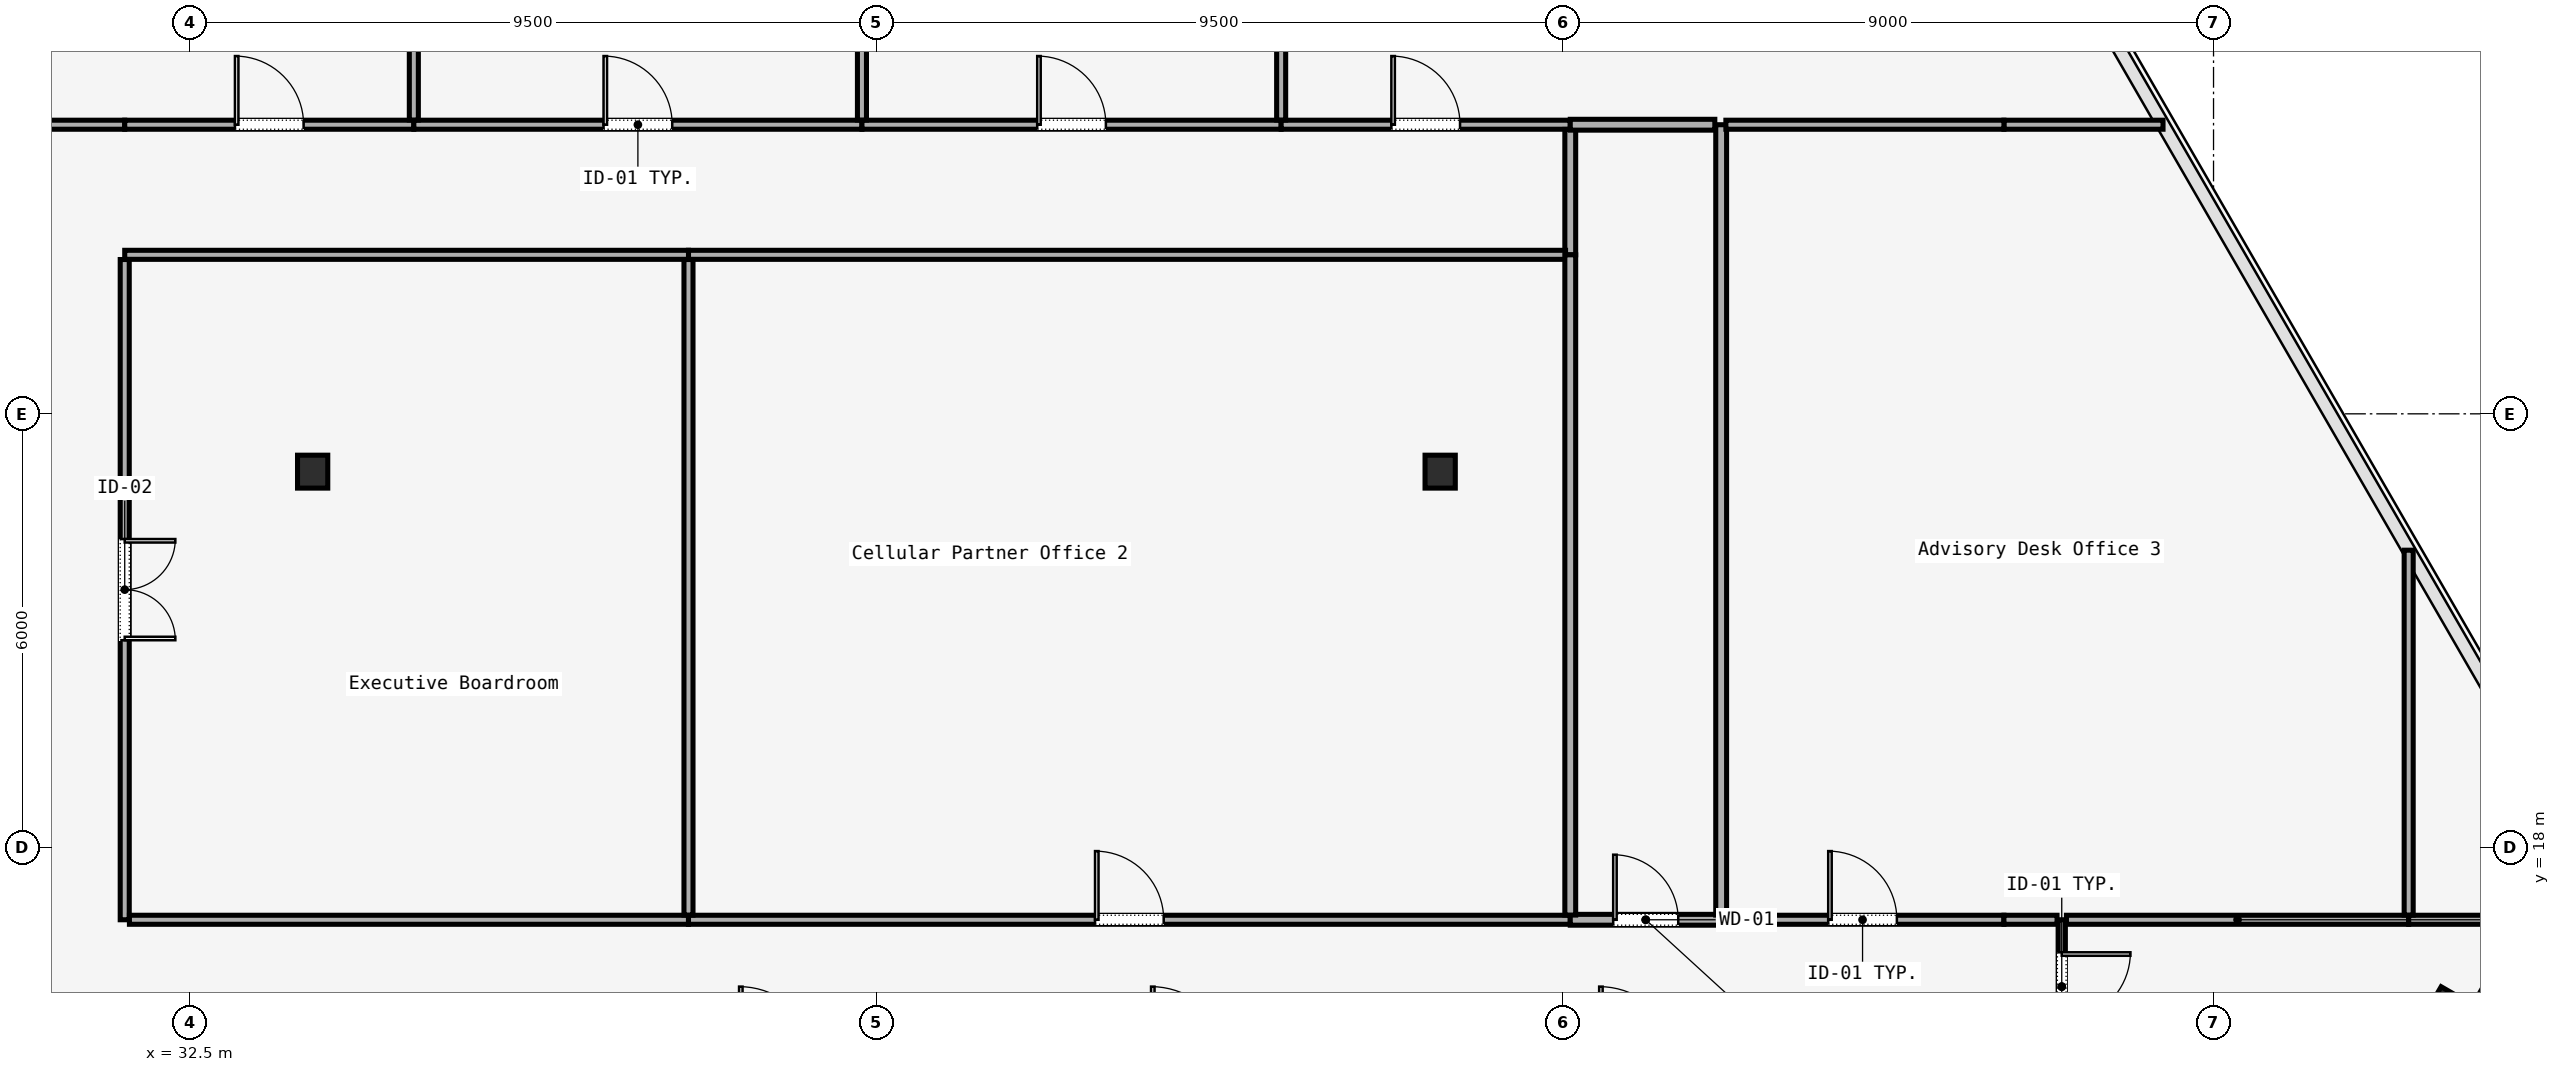
"""IFC4 building model, lengths in metres.
Left out: names, types, materials, properties, quantities, classifications, styles, units other than length and angle.
Written with IfcOpenShell. Run it as: python <this file> out.ifc"""

import sys

from ifc_helpers import new_model, si_unit, direction, frame, frame_2d, origin, origin_2d, place, context, subcontext, project, spatial, rectangle, i_section, extrude, element, fill, save


model = new_model("IFC4")
c1 = context("Model", 3, precision=1e-05, world=origin(), true_north=direction((0.0, 1.0)))
c2 = subcontext(c1, "Body", "Model", "MODEL_VIEW")
j1 = project(units=[si_unit("LENGTHUNIT", "METRE"), si_unit("PLANEANGLEUNIT", "RADIAN")], contexts=[c1])
p1 = place(None, origin())
s1 = spatial("IfcSite", under=j1, at=p1, CompositionType="ELEMENT")
p2 = place(p1, origin())
s2 = spatial("IfcBuilding", under=s1, at=p2, CompositionType="ELEMENT")
p3 = place(p2, frame((0.0, 0.0, 70.2)))
s3 = spatial("IfcBuildingStorey", under=s2, at=p3, CompositionType="ELEMENT", Elevation=70.2)
for number, where, z_axis, x_axis in (
    (1, (34.2, 23.2, 0.0), (0.0, 0.0, 1.0), (1.0, 0.0, 0.0)),
    (2, (49.8, 23.2, 0.0), (0.0, 0.0, 1.0), (1.0, 0.0, 0.0)),
):
    element("IfcColumn", number, at=place(p3, frame(where, z_axis=z_axis, x_axis=x_axis)), inside=s3, PredefinedType="COLUMN", context=c2, shape_type="SweptSolid", body=[
        extrude(i_section(OverallWidth=0.418, OverallDepth=0.456, WebThickness=0.042, FlangeThickness=0.067, FilletRadius=0.015, at=origin_2d()), origin(), (0.0, 0.0, 1.0), 3.58),
    ])
p4 = place(p3, frame((63.763, 15.756, 0.0), z_axis=(0.0, 0.0, 1.0), x_axis=(0.5, 0.866025403784, 0.0)))
e3 = element("IfcColumn", 3, at=p4, inside=s3, PredefinedType="COLUMN", context=c2, shape_type="SweptSolid", body=[
    extrude(i_section(OverallWidth=0.437, OverallDepth=0.514, WebThickness=0.061, FlangeThickness=0.077, FilletRadius=0.015, at=origin_2d()), origin(), (0.0, 0.0, 1.0), 3.58),
])
p5 = place(p3, frame((58.4, 17.0, 0.0), z_axis=(0.0, 0.0, 1.0), x_axis=(0.0, -1.0, 0.0)))
e4 = element("IfcWall", 4, at=p5, inside=s3, PredefinedType="MOVABLE", context=c2, shape_type="SweptSolid", body=[
    extrude(rectangle(XDim=1.85, YDim=0.1, at=frame_2d((0.925, 0.0))), origin(), (0.0, 0.0, 1.0), 2.95),
])
p6 = place(p5, frame((0.45, 0.0, 0.0)))
e5 = element("IfcOpeningElement", 5, at=p6, cuts=e4, PredefinedType="OPENING", context=c2, shape_type="SweptSolid", body=[
    extrude(rectangle(XDim=0.95, YDim=2.2, at=frame_2d((0.475, 1.1))), frame((0.0, 0.05, 0.0), z_axis=(0.0, -1.0, 0.0), x_axis=(1.0, 0.0, 0.0)), (0.0, 0.0, 1.0), 0.1),
])
p7 = place(p3, frame((29.865, 28.0, 0.0), z_axis=(0.0, 0.0, 1.0), x_axis=(1.0, 0.0, 0.0)))
e6 = element("IfcWall", 6, at=p7, inside=s3, PredefinedType="PARTITIONING", context=c2, shape_type="SweptSolid", body=[
    extrude(rectangle(XDim=1.735, YDim=0.125, at=frame_2d((0.868, 0.0))), origin(), (0.0, 0.0, 1.0), 2.95),
])
p8 = place(p3, frame((31.6, 28.0, 0.0), z_axis=(0.0, 0.0, 1.0), x_axis=(1.0, 0.0, 0.0)))
e7 = element("IfcWall", 7, at=p8, inside=s3, PredefinedType="PARTITIONING", context=c2, shape_type="SweptSolid", body=[
    extrude(rectangle(XDim=4.0, YDim=0.125, at=frame_2d((2.0, 0.0))), origin(), (0.0, 0.0, 1.0), 2.95),
])
p9 = place(p8, frame((1.525, 0.0, 0.0)))
e8 = element("IfcOpeningElement", 8, at=p9, cuts=e7, PredefinedType="OPENING", context=c2, shape_type="SweptSolid", body=[
    extrude(rectangle(XDim=0.95, YDim=2.2, at=frame_2d((0.475, 1.1))), frame((0.0, 0.062, 0.0), z_axis=(0.0, -1.0, 0.0), x_axis=(1.0, 0.0, 0.0)), (0.0, 0.0, 1.0), 0.125),
])
p10 = place(p3, frame((35.6, 28.0, 0.0), z_axis=(0.0, 0.0, 1.0), x_axis=(1.0, 0.0, 0.0)))
e9 = element("IfcWall", 9, at=p10, inside=s3, PredefinedType="PARTITIONING", context=c2, shape_type="SweptSolid", body=[
    extrude(rectangle(XDim=6.2, YDim=0.125, at=frame_2d((3.1, 0.0))), origin(), (0.0, 0.0, 1.0), 2.95),
])
p11 = place(p10, frame((2.625, 0.0, 0.0)))
e10 = element("IfcOpeningElement", 10, at=p11, cuts=e9, PredefinedType="OPENING", context=c2, shape_type="SweptSolid", body=[
    extrude(rectangle(XDim=0.95, YDim=2.2, at=frame_2d((0.475, 1.1))), frame((0.0, 0.062, 0.0), z_axis=(0.0, -1.0, 0.0), x_axis=(1.0, 0.0, 0.0)), (0.0, 0.0, 1.0), 0.125),
])
p12 = place(p3, frame((41.8, 28.0, 0.0), z_axis=(0.0, 0.0, 1.0), x_axis=(1.0, 0.0, 0.0)))
e11 = element("IfcWall", 11, at=p12, inside=s3, PredefinedType="PARTITIONING", context=c2, shape_type="SweptSolid", body=[
    extrude(rectangle(XDim=5.8, YDim=0.125, at=frame_2d((2.9, 0.0))), origin(), (0.0, 0.0, 1.0), 2.95),
])
p13 = place(p12, frame((2.425, 0.0, 0.0)))
e12 = element("IfcOpeningElement", 12, at=p13, cuts=e11, PredefinedType="OPENING", context=c2, shape_type="SweptSolid", body=[
    extrude(rectangle(XDim=0.95, YDim=2.2, at=frame_2d((0.475, 1.1))), frame((0.0, 0.062, 0.0), z_axis=(0.0, -1.0, 0.0), x_axis=(1.0, 0.0, 0.0)), (0.0, 0.0, 1.0), 0.125),
])
p14 = place(p3, frame((47.6, 28.0, 0.0), z_axis=(0.0, 0.0, 1.0), x_axis=(1.0, 0.0, 0.0)))
e13 = element("IfcWall", 13, at=p14, inside=s3, PredefinedType="PARTITIONING", context=c2, shape_type="SweptSolid", body=[
    extrude(rectangle(XDim=4.0, YDim=0.125, at=frame_2d((2.0, 0.0))), origin(), (0.0, 0.0, 1.0), 2.95),
])
p15 = place(p14, frame((1.525, 0.0, 0.0)))
e14 = element("IfcOpeningElement", 14, at=p15, cuts=e13, PredefinedType="OPENING", context=c2, shape_type="SweptSolid", body=[
    extrude(rectangle(XDim=0.95, YDim=2.2, at=frame_2d((0.475, 1.1))), frame((0.0, 0.062, 0.0), z_axis=(0.0, -1.0, 0.0), x_axis=(1.0, 0.0, 0.0)), (0.0, 0.0, 1.0), 0.125),
])
p16 = place(p3, frame((51.6, 27.935, 0.0), z_axis=(0.0, 0.0, 1.0), x_axis=(0.0, -1.0, 0.0)))
e15 = element("IfcWall", 15, at=p16, inside=s3, PredefinedType="PARTITIONING", context=c2, shape_type="SweptSolid", body=[
    extrude(rectangle(XDim=1.735, YDim=0.15, at=frame_2d((0.868, 0.0))), origin(), (0.0, 0.0, 1.0), 2.95),
])
p17 = place(p3, frame((51.535, 26.2, 0.0), z_axis=(0.0, 0.0, 1.0), x_axis=(-1.0, 0.0, 0.0)))
e16 = element("IfcWall", 16, at=p17, inside=s3, PredefinedType="PARTITIONING", context=c2, shape_type="SweptSolid", body=[
    extrude(rectangle(XDim=12.135, YDim=0.125, at=frame_2d((6.067, 0.0))), origin(), (0.0, 0.0, 1.0), 2.95),
])
p18 = place(p3, frame((39.4, 26.2, 0.0), z_axis=(0.0, 0.0, 1.0), x_axis=(-1.0, 0.0, 0.0)))
e17 = element("IfcWall", 17, at=p18, inside=s3, PredefinedType="PARTITIONING", context=c2, shape_type="SweptSolid", body=[
    extrude(rectangle(XDim=7.8, YDim=0.125, at=frame_2d((3.9, 0.0))), origin(), (0.0, 0.0, 1.0), 2.95),
])
p19 = place(p3, frame((31.6, 26.135, 0.0), z_axis=(0.0, 0.0, 1.0), x_axis=(0.0, -1.0, 0.0)))
e18 = element("IfcWall", 18, at=p19, inside=s3, PredefinedType="PARTITIONING", context=c2, shape_type="SweptSolid", body=[
    extrude(rectangle(XDim=9.135, YDim=0.125, at=frame_2d((4.567, 0.0))), origin(), (0.0, 0.0, 1.0), 2.95),
])
p20 = place(p19, frame((3.867, 0.0, 0.0)))
e19 = element("IfcOpeningElement", 19, at=p20, cuts=e18, PredefinedType="OPENING", context=c2, shape_type="SweptSolid", body=[
    extrude(rectangle(XDim=1.4, YDim=2.2, at=frame_2d((0.7, 1.1))), frame((0.0, 0.062, 0.0), z_axis=(0.0, -1.0, 0.0), x_axis=(1.0, 0.0, 0.0)), (0.0, 0.0, 1.0), 0.125),
])
p21 = place(p3, frame((31.665, 17.0, 0.0), z_axis=(0.0, 0.0, 1.0), x_axis=(1.0, 0.0, 0.0)))
e20 = element("IfcWall", 20, at=p21, inside=s3, PredefinedType="PARTITIONING", context=c2, shape_type="SweptSolid", body=[
    extrude(rectangle(XDim=7.735, YDim=0.125, at=frame_2d((3.867, 0.0))), origin(), (0.0, 0.0, 1.0), 2.95),
])
p22 = place(p3, frame((39.4, 17.0, 0.0), z_axis=(0.0, 0.0, 1.0), x_axis=(1.0, 0.0, 0.0)))
e21 = element("IfcWall", 21, at=p22, inside=s3, PredefinedType="PARTITIONING", context=c2, shape_type="SweptSolid", body=[
    extrude(rectangle(XDim=12.2, YDim=0.125, at=frame_2d((6.1, 0.0))), origin(), (0.0, 0.0, 1.0), 2.95),
])
p23 = place(p22, frame((5.625, 0.0, 0.0)))
e22 = element("IfcOpeningElement", 22, at=p23, cuts=e21, PredefinedType="OPENING", context=c2, shape_type="SweptSolid", body=[
    extrude(rectangle(XDim=0.95, YDim=2.2, at=frame_2d((0.475, 1.1))), frame((0.0, 0.062, 0.0), z_axis=(0.0, -1.0, 0.0), x_axis=(1.0, 0.0, 0.0)), (0.0, 0.0, 1.0), 0.125),
])
p24 = place(p3, frame((51.6, 17.0, 0.0), z_axis=(0.0, 0.0, 1.0), x_axis=(1.0, 0.0, 0.0)))
e23 = element("IfcWall", 23, at=p24, inside=s3, PredefinedType="PARTITIONING", context=c2, shape_type="SweptSolid", body=[
    extrude(rectangle(XDim=2.088, YDim=0.15, at=frame_2d((1.044, 0.0))), origin(), (0.0, 0.0, 1.0), 2.95),
])
p25 = place(p24, frame((0.594, 0.0, 0.0)))
e24 = element("IfcOpeningElement", 24, at=p25, cuts=e23, PredefinedType="OPENING", context=c2, shape_type="SweptSolid", body=[
    extrude(rectangle(XDim=0.9, YDim=2.15, at=frame_2d((0.45, 1.075))), frame((0.0, 0.075, 0.0), z_axis=(0.0, -1.0, 0.0), x_axis=(1.0, 0.0, 0.0)), (0.0, 0.0, 1.0), 0.15),
])
p26 = place(p3, frame((53.688, 17.0, 0.0), z_axis=(0.0, 0.0, 1.0), x_axis=(1.0, 0.0, 0.0)))
e25 = element("IfcWall", 25, at=p26, inside=s3, PredefinedType="PARTITIONING", context=c2, shape_type="SweptSolid", body=[
    extrude(rectangle(XDim=3.912, YDim=0.125, at=frame_2d((1.956, 0.0))), origin(), (0.0, 0.0, 1.0), 2.95),
])
p27 = place(p26, frame((1.481, 0.0, 0.0)))
e26 = element("IfcOpeningElement", 26, at=p27, cuts=e25, PredefinedType="OPENING", context=c2, shape_type="SweptSolid", body=[
    extrude(rectangle(XDim=0.95, YDim=2.2, at=frame_2d((0.475, 1.1))), frame((0.0, 0.062, 0.0), z_axis=(0.0, -1.0, 0.0), x_axis=(1.0, 0.0, 0.0)), (0.0, 0.0, 1.0), 0.125),
])
p28 = place(p3, frame((57.6, 17.0, 0.0), z_axis=(0.0, 0.0, 1.0), x_axis=(1.0, 0.0, 0.0)))
e27 = element("IfcWall", 27, at=p28, inside=s3, PredefinedType="PARTITIONING", context=c2, shape_type="SweptSolid", body=[
    extrude(rectangle(XDim=0.735, YDim=0.125, at=frame_2d((0.367, 0.0))), origin(), (0.0, 0.0, 1.0), 2.95),
])
p29 = place(p3, frame((58.465, 17.0, 0.0), z_axis=(0.0, 0.0, 1.0), x_axis=(1.0, 0.0, 0.0)))
e28 = element("IfcWall", 28, at=p29, inside=s3, PredefinedType="PARTITIONING", context=c2, shape_type="SweptSolid", body=[
    extrude(rectangle(XDim=4.735, YDim=0.125, at=frame_2d((2.367, 0.0))), origin(), (0.0, 0.0, 1.0), 2.95),
])
p30 = place(p3, frame((63.2, 17.0, 0.0), z_axis=(0.0, 0.0, 1.0), x_axis=(1.0, 0.0, 0.0)))
e29 = element("IfcWall", 29, at=p30, inside=s3, PredefinedType="PARTITIONING", context=c2, shape_type="SweptSolid", body=[
    extrude(rectangle(XDim=1.651, YDim=0.125, at=frame_2d((0.825, 0.0))), origin(), (0.0, 0.0, 1.0), 2.95),
])
p31 = place(p3, frame((39.4, 26.135, 0.0), z_axis=(0.0, 0.0, 1.0), x_axis=(0.0, -1.0, 0.0)))
e30 = element("IfcWall", 30, at=p31, inside=s3, PredefinedType="PARTITIONING", context=c2, shape_type="SweptSolid", body=[
    extrude(rectangle(XDim=9.07, YDim=0.125, at=frame_2d((4.535, 0.0))), origin(), (0.0, 0.0, 1.0), 2.95),
])
p32 = place(p3, frame((51.6, 26.2, 0.0), z_axis=(0.0, 0.0, 1.0), x_axis=(0.0, -1.0, 0.0)))
e31 = element("IfcWall", 31, at=p32, inside=s3, PredefinedType="PARTITIONING", context=c2, shape_type="SweptSolid", body=[
    extrude(rectangle(XDim=9.135, YDim=0.15, at=frame_2d((4.567, 0.0))), origin(), (0.0, 0.0, 1.0), 2.95),
])
p33 = place(p3, frame((57.6, 28.0, 0.0), z_axis=(0.0, 0.0, 1.0), x_axis=(1.0, 0.0, 0.0)))
e32 = element("IfcWall", 32, at=p33, inside=s3, PredefinedType="PARTITIONING", context=c2, shape_type="SweptSolid", body=[
    extrude(rectangle(XDim=2.201, YDim=0.125, at=frame_2d((1.101, 0.0))), origin(), (0.0, 0.0, 1.0), 2.95),
])
p34 = place(p3, frame((63.2, 22.113, 0.0), z_axis=(0.0, 0.0, 1.0), x_axis=(0.0, -1.0, 0.0)))
e33 = element("IfcWall", 33, at=p34, inside=s3, PredefinedType="PARTITIONING", context=c2, shape_type="SweptSolid", body=[
    extrude(rectangle(XDim=5.048, YDim=0.125, at=frame_2d((2.524, 0.0))), origin(), (0.0, 0.0, 1.0), 2.95),
])
p35 = place(p3, frame((53.688, 17.065, 0.0), z_axis=(0.0, 0.0, 1.0), x_axis=(0.0, 1.0, 0.0)))
e34 = element("IfcWall", 34, at=p35, inside=s3, PredefinedType="PARTITIONING", context=c2, shape_type="SweptSolid", body=[
    extrude(rectangle(XDim=10.935, YDim=0.15, at=frame_2d((5.468, 0.0))), origin(), (0.0, 0.0, 1.0), 2.95),
])
p36 = place(p3, frame((53.753, 28.0, 0.0), z_axis=(0.0, 0.0, 1.0), x_axis=(1.0, 0.0, 0.0)))
e35 = element("IfcWall", 35, at=p36, inside=s3, PredefinedType="PARTITIONING", context=c2, shape_type="SweptSolid", body=[
    extrude(rectangle(XDim=3.847, YDim=0.125, at=frame_2d((1.924, 0.0))), origin(), (0.0, 0.0, 1.0), 2.95),
])
p37 = place(p3, frame((51.6, 28.0, 0.0), z_axis=(0.0, 0.0, 1.0), x_axis=(1.0, 0.0, 0.0)))
e36 = element("IfcWall", 36, at=p37, inside=s3, PredefinedType="PARTITIONING", context=c2, shape_type="SweptSolid", body=[
    extrude(rectangle(XDim=2.0, YDim=0.15, at=frame_2d((1.0, 0.0))), origin(), (0.0, 0.0, 1.0), 2.95),
])
for number, where, z_axis, x_axis in (
    (37, (35.6, 45.865, 0.0), (0.0, 0.0, 1.0), (0.0, -1.0, 0.0)),
    (38, (47.6, 28.065, 0.0), (0.0, 0.0, 1.0), (0.0, 1.0, 0.0)),
    (39, (41.8, 45.865, 0.0), (0.0, 0.0, 1.0), (0.0, -1.0, 0.0)),
):
    element("IfcWall", number, at=place(p3, frame(where, z_axis=z_axis, x_axis=x_axis)), inside=s3, PredefinedType="PARTITIONING", context=c2, shape_type="SweptSolid", body=[
        extrude(rectangle(XDim=17.801, YDim=0.125, at=frame_2d((8.9, 0.0))), origin(), (0.0, 0.0, 1.0), 2.95),
    ])
p38 = place(p6, origin())
e40 = element("IfcDoor", 40, at=p38, inside=s3, OperationType="SINGLE_SWING_LEFT", PredefinedType="DOOR", context=c2, shape_type="SweptSolid", body=[
    extrude(rectangle(XDim=0.95, YDim=2.2, at=frame_2d((0.475, 1.1))), frame((0.0, 0.025, 0.0), z_axis=(0.0, -1.0, 0.0), x_axis=(1.0, 0.0, 0.0)), (0.0, 0.0, 1.0), 0.05),
])
fill(e5, e40)
p39 = place(p20, origin())
e41 = element("IfcDoor", 41, at=p39, inside=s3, OperationType="SINGLE_SWING_LEFT", PredefinedType="DOOR", context=c2, shape_type="SweptSolid", body=[
    extrude(rectangle(XDim=1.4, YDim=2.2, at=frame_2d((0.7, 1.1))), frame((0.0, 0.025, 0.0), z_axis=(0.0, -1.0, 0.0), x_axis=(1.0, 0.0, 0.0)), (0.0, 0.0, 1.0), 0.05),
])
fill(e19, e41)
p40 = place(p23, origin())
e42 = element("IfcDoor", 42, at=p40, inside=s3, OperationType="SINGLE_SWING_RIGHT", PredefinedType="DOOR", context=c2, shape_type="SweptSolid", body=[
    extrude(rectangle(XDim=0.95, YDim=2.2, at=frame_2d((0.475, 1.1))), frame((0.0, 0.025, 0.0), z_axis=(0.0, -1.0, 0.0), x_axis=(1.0, 0.0, 0.0)), (0.0, 0.0, 1.0), 0.05),
])
fill(e22, e42)
p41 = place(p27, origin())
e43 = element("IfcDoor", 43, at=p41, inside=s3, OperationType="SINGLE_SWING_LEFT", PredefinedType="DOOR", context=c2, shape_type="SweptSolid", body=[
    extrude(rectangle(XDim=0.95, YDim=2.2, at=frame_2d((0.475, 1.1))), frame((0.0, 0.025, 0.0), z_axis=(0.0, -1.0, 0.0), x_axis=(1.0, 0.0, 0.0)), (0.0, 0.0, 1.0), 0.05),
])
fill(e26, e43)
p42 = place(p25, origin())
e44 = element("IfcDoor", 44, at=p42, inside=s3, OperationType="SINGLE_SWING_RIGHT", PredefinedType="DOOR", context=c2, shape_type="SweptSolid", body=[
    extrude(rectangle(XDim=0.9, YDim=2.15, at=frame_2d((0.45, 1.075))), frame((0.0, 0.025, 0.0), z_axis=(0.0, -1.0, 0.0), x_axis=(1.0, 0.0, 0.0)), (0.0, 0.0, 1.0), 0.05),
])
fill(e24, e44)
p43 = place(p9, origin())
e45 = element("IfcDoor", 45, at=p43, inside=s3, OperationType="SINGLE_SWING_RIGHT", PredefinedType="DOOR", context=c2, shape_type="SweptSolid", body=[
    extrude(rectangle(XDim=0.95, YDim=2.2, at=frame_2d((0.475, 1.1))), frame((0.0, 0.025, 0.0), z_axis=(0.0, -1.0, 0.0), x_axis=(1.0, 0.0, 0.0)), (0.0, 0.0, 1.0), 0.05),
])
fill(e8, e45)
p44 = place(p15, origin())
e46 = element("IfcDoor", 46, at=p44, inside=s3, OperationType="SINGLE_SWING_LEFT", PredefinedType="DOOR", context=c2, shape_type="SweptSolid", body=[
    extrude(rectangle(XDim=0.95, YDim=2.2, at=frame_2d((0.475, 1.1))), frame((0.0, 0.025, 0.0), z_axis=(0.0, -1.0, 0.0), x_axis=(1.0, 0.0, 0.0)), (0.0, 0.0, 1.0), 0.05),
])
fill(e14, e46)
p45 = place(p11, origin())
e47 = element("IfcDoor", 47, at=p45, inside=s3, OperationType="SINGLE_SWING_RIGHT", PredefinedType="DOOR", context=c2, shape_type="SweptSolid", body=[
    extrude(rectangle(XDim=0.95, YDim=2.2, at=frame_2d((0.475, 1.1))), frame((0.0, 0.025, 0.0), z_axis=(0.0, -1.0, 0.0), x_axis=(1.0, 0.0, 0.0)), (0.0, 0.0, 1.0), 0.05),
])
fill(e10, e47)
p46 = place(p13, origin())
e48 = element("IfcDoor", 48, at=p46, inside=s3, OperationType="SINGLE_SWING_LEFT", PredefinedType="DOOR", context=c2, shape_type="SweptSolid", body=[
    extrude(rectangle(XDim=0.95, YDim=2.2, at=frame_2d((0.475, 1.1))), frame((0.0, 0.025, 0.0), z_axis=(0.0, -1.0, 0.0), x_axis=(1.0, 0.0, 0.0)), (0.0, 0.0, 1.0), 0.05),
])
fill(e12, e48)
save(model, sys.argv[1])
